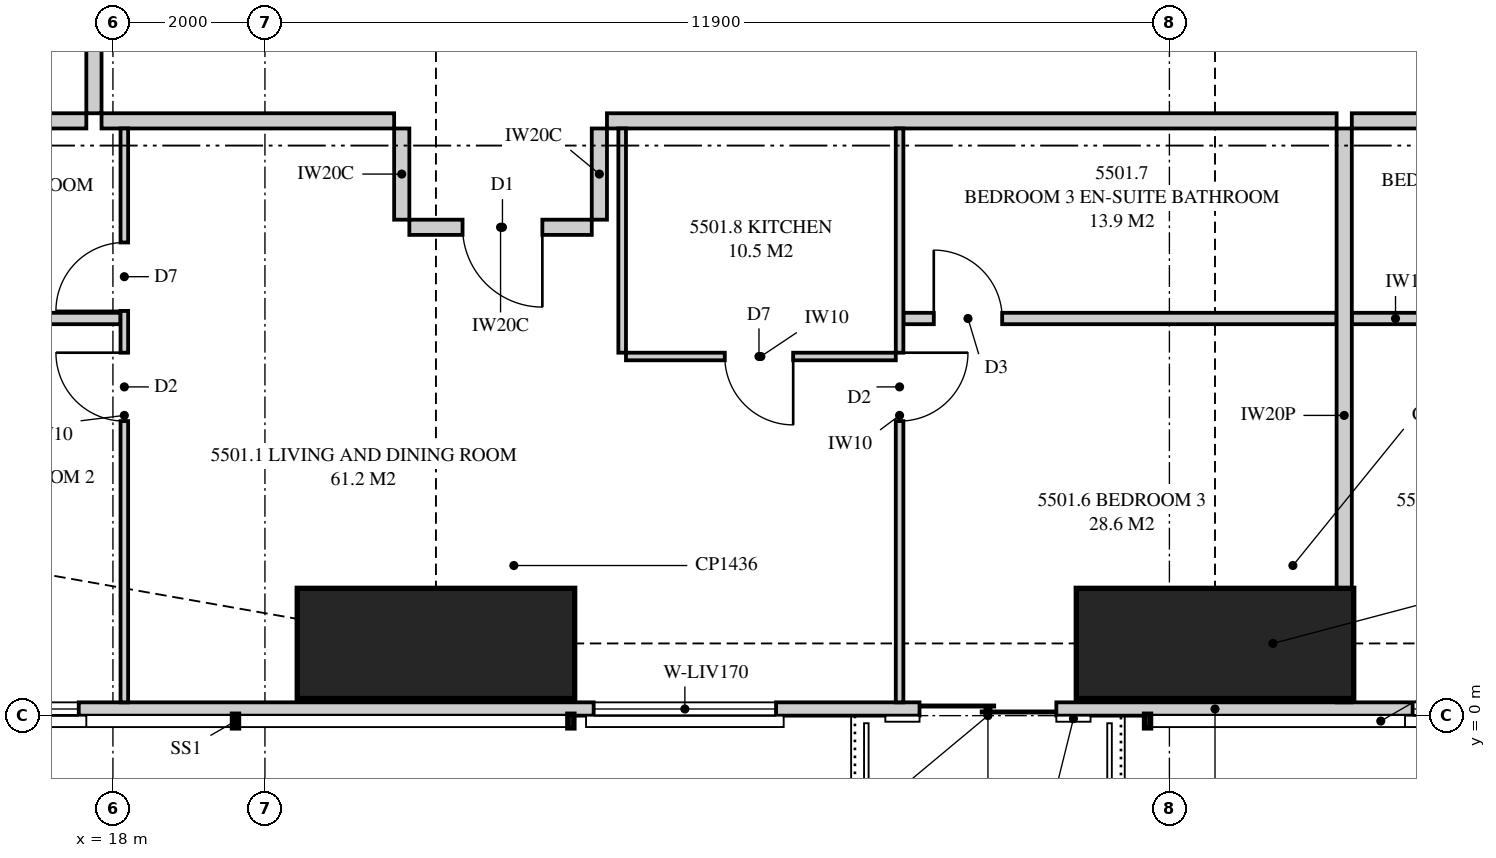
"""IFC4 building model, lengths in metres.
Left out: names, types, materials, properties, quantities, classifications, styles, units other than length and angle.
Written with IfcOpenShell. Run it as: python <this file> out.ifc"""

import sys

from ifc_helpers import new_model, si_unit, direction, frame, frame_2d, origin, origin_2d, place, context, subcontext, project, spatial, polyline, rectangle, outline, extrude, element, fill, save


model = new_model("IFC4")
c1 = context("Model", 3, precision=1e-05, world=origin(), true_north=direction((0.0, 1.0)))
c2 = subcontext(c1, "Body", "Model", "MODEL_VIEW")
j1 = project(units=[si_unit("LENGTHUNIT", "METRE"), si_unit("PLANEANGLEUNIT", "RADIAN")], contexts=[c1])
p1 = place(None, origin())
s1 = spatial("IfcSite", under=j1, at=p1, CompositionType="ELEMENT")
p2 = place(p1, origin())
s2 = spatial("IfcBuilding", under=s1, at=p2, CompositionType="ELEMENT")
p3 = place(p2, frame((0.0, 0.0, 201.25)))
s3 = spatial("IfcBuildingStorey", under=s2, at=p3, CompositionType="ELEMENT", Elevation=201.25)
for number, where, z_axis, x_axis in (
    (1, (22.25, 0.95, 0.0), (0.0, 0.0, 1.0), (0.0, 1.0, 0.0)),
    (2, (32.5, 0.95, 0.0), (0.0, 0.0, 1.0), (0.0, 1.0, 0.0)),
):
    element("IfcColumn", number, at=place(p3, frame(where, z_axis=z_axis, x_axis=x_axis)), inside=s3, PredefinedType="COLUMN", context=c2, shape_type="SweptSolid", body=[
        extrude(rectangle(XDim=1.45, YDim=3.65, at=origin_2d()), origin(), (0.0, 0.0, 1.0), 3.35),
    ])
p4 = place(p3, frame((15.051, 0.087, 0.0), z_axis=(0.0, 0.0, 1.0), x_axis=(1.0, 0.0, 0.0)))
e3 = element("IfcWall", 3, at=p4, inside=s3, PredefinedType="SOLIDWALL", context=c2, shape_type="SweptSolid", body=[
    extrude(outline(polyline([(0.0, 0.0), (34.897, 0.0), (34.897, 3.11), (27.91, 3.11), (27.91, 2.15), (27.836, 2.15), (27.836, 3.11), (27.699, 3.11), (27.699, 2.15), (7.199, 2.15), (7.199, 3.11), (7.062, 3.11), (7.062, 2.15), (6.987, 2.15), (6.987, 3.11), (0.0, 3.11), (0.0, 0.0)])), frame((0.0, 0.087, 0.0), z_axis=(0.0, -1.0, 0.0), x_axis=(1.0, 0.0, 0.0)), (0.0, 0.0, 1.0), 0.175),
])
p5 = place(p4, frame((0.699, 0.0, 0.4)))
e4 = element("IfcOpeningElement", 4, at=p5, cuts=e3, PredefinedType="OPENING", context=c2, shape_type="SweptSolid", body=[
    extrude(rectangle(XDim=1.8, YDim=1.7, at=frame_2d((0.9, 0.85))), frame((0.0, 0.097, 0.0), z_axis=(0.0, -1.0, 0.0), x_axis=(1.0, 0.0, 0.0)), (0.0, 0.0, 1.0), 0.195),
])
p6 = place(p4, frame((9.274, 0.0, 0.4)))
e5 = element("IfcOpeningElement", 5, at=p6, cuts=e3, PredefinedType="OPENING", context=c2, shape_type="SweptSolid", body=[
    extrude(rectangle(XDim=2.4, YDim=1.7, at=frame_2d((1.2, 0.85))), frame((0.0, 0.097, 0.0), z_axis=(0.0, -1.0, 0.0), x_axis=(1.0, 0.0, 0.0)), (0.0, 0.0, 1.0), 0.195),
])
p7 = place(p4, frame((13.561, 0.0, 0.0)))
e6 = element("IfcOpeningElement", 6, at=p7, cuts=e3, PredefinedType="OPENING", context=c2, shape_type="SweptSolid", body=[
    extrude(rectangle(XDim=1.8, YDim=2.1, at=frame_2d((0.9, 1.05))), frame((0.0, 0.097, 0.0), z_axis=(0.0, -1.0, 0.0), x_axis=(1.0, 0.0, 0.0)), (0.0, 0.0, 1.0), 0.195),
])
p8 = place(p4, frame((20.049, 0.0, 0.4)))
e7 = element("IfcOpeningElement", 7, at=p8, cuts=e3, PredefinedType="OPENING", context=c2, shape_type="SweptSolid", body=[
    extrude(rectangle(XDim=1.8, YDim=1.7, at=frame_2d((0.9, 0.85))), frame((0.0, 0.097, 0.0), z_axis=(0.0, -1.0, 0.0), x_axis=(1.0, 0.0, 0.0)), (0.0, 0.0, 1.0), 0.195),
])
p9 = place(p4, frame((23.649, 0.0, 0.4)))
e8 = element("IfcOpeningElement", 8, at=p9, cuts=e3, PredefinedType="OPENING", context=c2, shape_type="SweptSolid", body=[
    extrude(rectangle(XDim=1.8, YDim=1.7, at=frame_2d((0.9, 0.85))), frame((0.0, 0.097, 0.0), z_axis=(0.0, -1.0, 0.0), x_axis=(1.0, 0.0, 0.0)), (0.0, 0.0, 1.0), 0.195),
])
p10 = place(p4, frame((29.625, 0.0, 0.4)))
e9 = element("IfcOpeningElement", 9, at=p10, cuts=e3, PredefinedType="OPENING", context=c2, shape_type="SweptSolid", body=[
    extrude(rectangle(XDim=1.8, YDim=1.7, at=frame_2d((0.9, 0.85))), frame((0.0, 0.097, 0.0), z_axis=(0.0, -1.0, 0.0), x_axis=(1.0, 0.0, 0.0)), (0.0, 0.0, 1.0), 0.195),
])
p11 = place(p4, frame((32.51, 0.0, 0.4)))
e10 = element("IfcOpeningElement", 10, at=p11, cuts=e3, PredefinedType="OPENING", context=c2, shape_type="SweptSolid", body=[
    extrude(rectangle(XDim=1.8, YDim=1.7, at=frame_2d((0.9, 0.85))), frame((0.0, 0.097, 0.0), z_axis=(0.0, -1.0, 0.0), x_axis=(1.0, 0.0, 0.0)), (0.0, 0.0, 1.0), 0.195),
])
p12 = place(p3, frame((34.2, 0.175, 0.0), z_axis=(0.0, 0.0, 1.0), x_axis=(0.0, 1.0, 0.0)))
e11 = element("IfcWall", 11, at=p12, inside=s3, PredefinedType="PARTITIONING", context=c2, shape_type="SweptSolid", body=[
    extrude(outline(polyline([(0.0, 0.0), (7.55, 0.0), (7.55, 3.11), (1.685, 3.11), (1.685, 2.15), (0.0, 2.15), (0.0, 3.11), (0.0, 0.0)])), frame((0.0, 0.1, 0.0), z_axis=(0.0, -1.0, 0.0), x_axis=(1.0, 0.0, 0.0)), (0.0, 0.0, 1.0), 0.2),
])
p13 = place(p3, frame((17.85, 7.825, 0.0), z_axis=(0.0, 0.0, 1.0), x_axis=(1.0, 0.0, 0.0)))
e12 = element("IfcWall", 12, at=p13, inside=s3, PredefinedType="PARTITIONING", context=c2, shape_type="SweptSolid", body=[
    extrude(rectangle(XDim=3.85, YDim=0.2, at=frame_2d((1.925, 0.0))), origin(), (0.0, 0.0, 1.0), 3.11),
])
p14 = place(p3, frame((18.15, 0.175, 0.0), z_axis=(0.0, 0.0, 1.0), x_axis=(0.0, 1.0, 0.0)))
e13 = element("IfcWall", 13, at=p14, inside=s3, PredefinedType="PARTITIONING", context=c2, shape_type="SweptSolid", body=[
    extrude(outline(polyline([(0.0, 0.0), (7.55, 0.0), (7.55, 3.11), (2.374, 3.11), (2.374, 2.15), (0.627, 2.15), (0.627, 3.11), (0.0, 3.11), (0.0, 0.0)])), frame((0.0, 0.05, 0.0), z_axis=(0.0, -1.0, 0.0), x_axis=(1.0, 0.0, 0.0)), (0.0, 0.0, 1.0), 0.1),
])
p15 = place(p14, frame((3.7, 0.0, 0.0)))
e14 = element("IfcOpeningElement", 14, at=p15, cuts=e13, PredefinedType="OPENING", context=c2, shape_type="SweptSolid", body=[
    extrude(rectangle(XDim=0.9, YDim=2.1, at=frame_2d((0.45, 1.05))), frame((0.0, 0.06, 0.0), z_axis=(0.0, -1.0, 0.0), x_axis=(1.0, 0.0, 0.0)), (0.0, 0.0, 1.0), 0.12),
])
p16 = place(p14, frame((5.15, 0.0, 0.0)))
e15 = element("IfcOpeningElement", 15, at=p16, cuts=e13, PredefinedType="OPENING", context=c2, shape_type="SweptSolid", body=[
    extrude(rectangle(XDim=0.9, YDim=2.1, at=frame_2d((0.45, 1.05))), frame((0.0, 0.06, 0.0), z_axis=(0.0, -1.0, 0.0), x_axis=(1.0, 0.0, 0.0)), (0.0, 0.0, 1.0), 0.12),
])
p17 = place(p3, frame((28.35, 0.175, 0.0), z_axis=(0.0, 0.0, 1.0), x_axis=(0.0, 1.0, 0.0)))
e16 = element("IfcWall", 16, at=p17, inside=s3, PredefinedType="PARTITIONING", context=c2, shape_type="SweptSolid", body=[
    extrude(outline(polyline([(0.0, 0.0), (7.55, 0.0), (7.55, 3.11), (1.635, 3.11), (1.635, 2.15), (0.0, 2.15), (0.0, 3.11), (0.0, 0.0)])), frame((0.0, 0.05, 0.0), z_axis=(0.0, -1.0, 0.0), x_axis=(1.0, 0.0, 0.0)), (0.0, 0.0, 1.0), 0.1),
])
p18 = place(p17, frame((3.7, 0.0, 0.0)))
e17 = element("IfcOpeningElement", 17, at=p18, cuts=e16, PredefinedType="OPENING", context=c2, shape_type="SweptSolid", body=[
    extrude(rectangle(XDim=0.9, YDim=2.1, at=frame_2d((0.45, 1.05))), frame((0.0, 0.06, 0.0), z_axis=(0.0, -1.0, 0.0), x_axis=(1.0, 0.0, 0.0)), (0.0, 0.0, 1.0), 0.12),
])
p19 = place(p3, frame((15.2, 5.225, 0.0), z_axis=(0.0, 0.0, 1.0), x_axis=(1.0, 0.0, 0.0)))
e18 = element("IfcWall", 18, at=p19, inside=s3, PredefinedType="PLUMBINGWALL", context=c2, shape_type="SweptSolid", body=[
    extrude(rectangle(XDim=2.9, YDim=0.15, at=frame_2d((1.45, 0.0))), origin(), (0.0, 0.0, 1.0), 3.11),
])
p20 = place(p3, frame((28.4, 5.225, 0.0), z_axis=(0.0, 0.0, 1.0), x_axis=(1.0, 0.0, 0.0)))
e19 = element("IfcWall", 19, at=p20, inside=s3, PredefinedType="PLUMBINGWALL", context=c2, shape_type="SweptSolid", body=[
    extrude(outline(polyline([(0.0, 0.0), (5.7, 0.0), (5.7, 3.11), (4.412, 3.11), (4.412, 2.541), (3.788, 2.541), (3.788, 3.11), (0.0, 3.11), (0.0, 0.0)])), frame((0.0, 0.075, 0.0), z_axis=(0.0, -1.0, 0.0), x_axis=(1.0, 0.0, 0.0)), (0.0, 0.0, 1.0), 0.15),
])
p21 = place(p20, frame((0.4, 0.0, 0.0)))
e20 = element("IfcOpeningElement", 20, at=p21, cuts=e19, PredefinedType="OPENING", context=c2, shape_type="SweptSolid", body=[
    extrude(rectangle(XDim=0.9, YDim=2.1, at=frame_2d((0.45, 1.05))), frame((0.0, 0.085, 0.0), z_axis=(0.0, -1.0, 0.0), x_axis=(1.0, 0.0, 0.0)), (0.0, 0.0, 1.0), 0.17),
])
p22 = place(p3, frame((24.75, 4.725, 0.0), z_axis=(0.0, 0.0, 1.0), x_axis=(1.0, 0.0, 0.0)))
e21 = element("IfcWall", 21, at=p22, inside=s3, PredefinedType="PARTITIONING", context=c2, shape_type="SweptSolid", body=[
    extrude(rectangle(XDim=3.55, YDim=0.1, at=frame_2d((1.775, 0.0))), origin(), (0.0, 0.0, 1.0), 3.11),
])
p23 = place(p22, frame((1.3, 0.0, 0.0)))
e22 = element("IfcOpeningElement", 22, at=p23, cuts=e21, PredefinedType="OPENING", context=c2, shape_type="SweptSolid", body=[
    extrude(rectangle(XDim=0.9, YDim=2.1, at=frame_2d((0.45, 1.05))), frame((0.0, 0.06, 0.0), z_axis=(0.0, -1.0, 0.0), x_axis=(1.0, 0.0, 0.0)), (0.0, 0.0, 1.0), 0.12),
])
p24 = place(p3, frame((24.7, 4.775, 0.0), z_axis=(0.0, 0.0, 1.0), x_axis=(0.0, 1.0, 0.0)))
e23 = element("IfcWall", 23, at=p24, inside=s3, PredefinedType="PARTITIONING", context=c2, shape_type="SweptSolid", body=[
    extrude(rectangle(XDim=2.95, YDim=0.1, at=frame_2d((1.475, 0.0))), origin(), (0.0, 0.0, 1.0), 3.11),
])
p25 = place(p3, frame((34.3, 7.825, 0.0), z_axis=(0.0, 0.0, 1.0), x_axis=(1.0, 0.0, 0.0)))
e24 = element("IfcWall", 24, at=p25, inside=s3, PredefinedType="PARTITIONING", context=c2, shape_type="SweptSolid", body=[
    extrude(outline(polyline([(0.0, 0.0), (11.65, 0.0), (11.65, 3.11), (8.787, 3.11), (8.787, 2.541), (8.113, 2.541), (8.113, 3.11), (0.0, 3.11), (0.0, 0.0)])), frame((0.0, 0.1, 0.0), z_axis=(0.0, -1.0, 0.0), x_axis=(1.0, 0.0, 0.0)), (0.0, 0.0, 1.0), 0.2),
])
p26 = place(p25, frame((8.8, 0.0, 0.0)))
e25 = element("IfcOpeningElement", 25, at=p26, cuts=e24, PredefinedType="OPENING", context=c2, shape_type="SweptSolid", body=[
    extrude(rectangle(XDim=1.05, YDim=2.2, at=frame_2d((0.525, 1.1))), frame((0.0, 0.11, 0.0), z_axis=(0.0, -1.0, 0.0), x_axis=(1.0, 0.0, 0.0)), (0.0, 0.0, 1.0), 0.22),
])
p27 = place(p3, frame((34.3, 5.225, 0.0), z_axis=(0.0, 0.0, 1.0), x_axis=(1.0, 0.0, 0.0)))
e26 = element("IfcWall", 26, at=p27, inside=s3, PredefinedType="PLUMBINGWALL", context=c2, shape_type="SweptSolid", body=[
    extrude(rectangle(XDim=3.45, YDim=0.15, at=frame_2d((1.725, 0.0))), origin(), (0.0, 0.0, 1.0), 3.11),
])
p28 = place(p27, frame((2.15, 0.0, 0.0)))
e27 = element("IfcOpeningElement", 27, at=p28, cuts=e26, PredefinedType="OPENING", context=c2, shape_type="SweptSolid", body=[
    extrude(rectangle(XDim=0.9, YDim=2.1, at=frame_2d((0.45, 1.05))), frame((0.0, 0.085, 0.0), z_axis=(0.0, -1.0, 0.0), x_axis=(1.0, 0.0, 0.0)), (0.0, 0.0, 1.0), 0.17),
])
p29 = place(p3, frame((12.0, 7.825, 0.0), z_axis=(0.0, 0.0, 1.0), x_axis=(1.0, 0.0, 0.0)))
e28 = element("IfcWall", 28, at=p29, inside=s3, PredefinedType="PARTITIONING", context=c2, shape_type="SweptSolid", body=[
    extrude(outline(polyline([(0.0, 0.0), (5.65, 0.0), (5.65, 3.11), (2.547, 3.11), (2.547, 2.15), (0.712, 2.15), (0.712, 3.11), (0.0, 3.11), (0.0, 0.0)])), frame((0.0, 0.1, 0.0), z_axis=(0.0, -1.0, 0.0), x_axis=(1.0, 0.0, 0.0)), (0.0, 0.0, 1.0), 0.2),
])
p30 = place(p3, frame((17.75, 7.925, 0.0), z_axis=(0.0, 0.0, 1.0), x_axis=(0.0, 1.0, 0.0)))
e29 = element("IfcWall", 29, at=p30, inside=s3, PredefinedType="PARTITIONING", context=c2, shape_type="SweptSolid", body=[
    extrude(outline(polyline([(0.0, 0.0), (14.925, 0.0), (14.925, 3.11), (5.412, 3.11), (5.412, 2.541), (4.738, 2.541), (4.738, 3.11), (0.0, 3.11), (0.0, 0.0)])), frame((0.0, 0.1, 0.0), z_axis=(0.0, -1.0, 0.0), x_axis=(1.0, 0.0, 0.0)), (0.0, 0.0, 1.0), 0.2),
])
p31 = place(p30, frame((6.962, 0.0, 0.0)))
e30 = element("IfcOpeningElement", 30, at=p31, cuts=e29, PredefinedType="OPENING", context=c2, shape_type="SweptSolid", body=[
    extrude(rectangle(XDim=1.05, YDim=2.2, at=frame_2d((0.525, 1.1))), frame((0.0, 0.11, 0.0), z_axis=(0.0, -1.0, 0.0), x_axis=(1.0, 0.0, 0.0)), (0.0, 0.0, 1.0), 0.22),
])
p32 = place(p3, frame((24.5, 7.825, 0.0), z_axis=(0.0, 0.0, 1.0), x_axis=(1.0, 0.0, 0.0)))
e31 = element("IfcWall", 31, at=p32, inside=s3, PredefinedType="PARTITIONING", context=c2, shape_type="SweptSolid", body=[
    extrude(outline(polyline([(0.0, 0.0), (9.6, 0.0), (9.6, 3.11), (8.337, 3.11), (8.337, 2.541), (7.663, 2.541), (7.663, 3.11), (0.0, 3.11), (0.0, 0.0)])), frame((0.0, 0.1, 0.0), z_axis=(0.0, -1.0, 0.0), x_axis=(1.0, 0.0, 0.0)), (0.0, 0.0, 1.0), 0.2),
])
p33 = place(p3, frame((21.9, 6.425, 0.0), z_axis=(0.0, 0.0, 1.0), x_axis=(1.0, 0.0, 0.0)))
e32 = element("IfcWall", 32, at=p33, inside=s3, PredefinedType="PARTITIONING", context=c2, shape_type="SweptSolid", body=[
    extrude(outline(polyline([(0.0, 0.0), (2.4, 0.0), (2.4, 3.11), (0.687, 3.11), (0.687, 2.541), (0.013, 2.541), (0.013, 3.11), (0.0, 3.11), (0.0, 0.0)])), frame((0.0, 0.1, 0.0), z_axis=(0.0, -1.0, 0.0), x_axis=(1.0, 0.0, 0.0)), (0.0, 0.0, 1.0), 0.2),
])
p34 = place(p33, frame((0.7, 0.0, 0.0)))
e33 = element("IfcOpeningElement", 33, at=p34, cuts=e32, PredefinedType="OPENING", context=c2, shape_type="SweptSolid", body=[
    extrude(rectangle(XDim=1.05, YDim=2.2, at=frame_2d((0.525, 1.1))), frame((0.0, 0.11, 0.0), z_axis=(0.0, -1.0, 0.0), x_axis=(1.0, 0.0, 0.0)), (0.0, 0.0, 1.0), 0.22),
])
for number, where, z_axis, x_axis in (
    (34, (21.8, 7.725, 0.0), (0.0, 0.0, 1.0), (0.0, -1.0, 0.0)),
    (35, (24.4, 7.725, 0.0), (0.0, 0.0, 1.0), (0.0, -1.0, 0.0)),
):
    element("IfcWall", number, at=place(p3, frame(where, z_axis=z_axis, x_axis=x_axis)), inside=s3, PredefinedType="PARTITIONING", context=c2, shape_type="SweptSolid", body=[
        extrude(rectangle(XDim=1.2, YDim=0.2, at=frame_2d((0.6, 0.0))), origin(), (0.0, 0.0, 1.0), 3.11),
    ])
p35 = place(p5, origin())
e36 = element("IfcWindow", 36, at=p35, inside=s3, PartitioningType="SINGLE_PANEL", PredefinedType="WINDOW", context=c2, shape_type="SweptSolid", body=[
    extrude(rectangle(XDim=1.8, YDim=1.7, at=frame_2d((0.9, 0.85))), frame((0.0, 0.03, 0.0), z_axis=(0.0, -1.0, 0.0), x_axis=(1.0, 0.0, 0.0)), (0.0, 0.0, 1.0), 0.06),
])
fill(e4, e36)
p36 = place(p6, origin())
e37 = element("IfcWindow", 37, at=p36, inside=s3, PartitioningType="SINGLE_PANEL", PredefinedType="WINDOW", context=c2, shape_type="SweptSolid", body=[
    extrude(rectangle(XDim=2.4, YDim=1.7, at=frame_2d((1.2, 0.85))), frame((0.0, 0.03, 0.0), z_axis=(0.0, -1.0, 0.0), x_axis=(1.0, 0.0, 0.0)), (0.0, 0.0, 1.0), 0.06),
])
fill(e5, e37)
p37 = place(p7, origin())
e38 = element("IfcDoor", 38, at=p37, inside=s3, OperationType="SLIDING_TO_LEFT", PredefinedType="DOOR", context=c2, shape_type="SweptSolid", body=[
    extrude(rectangle(XDim=1.8, YDim=2.1, at=frame_2d((0.9, 1.05))), frame((0.0, 0.025, 0.0), z_axis=(0.0, -1.0, 0.0), x_axis=(1.0, 0.0, 0.0)), (0.0, 0.0, 1.0), 0.05),
])
fill(e6, e38)
p38 = place(p8, origin())
e39 = element("IfcWindow", 39, at=p38, inside=s3, PartitioningType="SINGLE_PANEL", PredefinedType="WINDOW", context=c2, shape_type="SweptSolid", body=[
    extrude(rectangle(XDim=1.8, YDim=1.7, at=frame_2d((0.9, 0.85))), frame((0.0, 0.03, 0.0), z_axis=(0.0, -1.0, 0.0), x_axis=(1.0, 0.0, 0.0)), (0.0, 0.0, 1.0), 0.06),
])
fill(e7, e39)
p39 = place(p34, frame((1.05, 0.0, 0.0), z_axis=(0.0, 0.0, 1.0), x_axis=(-1.0, 0.0, 0.0)))
e40 = element("IfcDoor", 40, at=p39, inside=s3, OperationType="SINGLE_SWING_LEFT", PredefinedType="DOOR", context=c2, shape_type="SweptSolid", body=[
    extrude(rectangle(XDim=1.05, YDim=2.2, at=frame_2d((0.525, 1.1))), frame((0.0, 0.025, 0.0), z_axis=(0.0, -1.0, 0.0), x_axis=(1.0, 0.0, 0.0)), (0.0, 0.0, 1.0), 0.05),
])
fill(e33, e40)
p40 = place(p15, origin())
e41 = element("IfcDoor", 41, at=p40, inside=s3, OperationType="SINGLE_SWING_RIGHT", PredefinedType="DOOR", context=c2, shape_type="SweptSolid", body=[
    extrude(rectangle(XDim=0.9, YDim=2.1, at=frame_2d((0.45, 1.05))), frame((0.0, 0.025, 0.0), z_axis=(0.0, -1.0, 0.0), x_axis=(1.0, 0.0, 0.0)), (0.0, 0.0, 1.0), 0.05),
])
fill(e14, e41)
p41 = place(p16, origin())
e42 = element("IfcDoor", 42, at=p41, inside=s3, OperationType="SINGLE_SWING_LEFT", PredefinedType="DOOR", context=c2, shape_type="SweptSolid", body=[
    extrude(rectangle(XDim=0.9, YDim=2.1, at=frame_2d((0.45, 1.05))), frame((0.0, 0.025, 0.0), z_axis=(0.0, -1.0, 0.0), x_axis=(1.0, 0.0, 0.0)), (0.0, 0.0, 1.0), 0.05),
])
fill(e15, e42)
p42 = place(p18, frame((0.9, 0.0, 0.0), z_axis=(0.0, 0.0, 1.0), x_axis=(-1.0, 0.0, 0.0)))
e43 = element("IfcDoor", 43, at=p42, inside=s3, OperationType="SINGLE_SWING_LEFT", PredefinedType="DOOR", context=c2, shape_type="SweptSolid", body=[
    extrude(rectangle(XDim=0.9, YDim=2.1, at=frame_2d((0.45, 1.05))), frame((0.0, 0.025, 0.0), z_axis=(0.0, -1.0, 0.0), x_axis=(1.0, 0.0, 0.0)), (0.0, 0.0, 1.0), 0.05),
])
fill(e17, e43)
p43 = place(p21, origin())
e44 = element("IfcDoor", 44, at=p43, inside=s3, OperationType="SINGLE_SWING_LEFT", PredefinedType="DOOR", context=c2, shape_type="SweptSolid", body=[
    extrude(rectangle(XDim=0.9, YDim=2.1, at=frame_2d((0.45, 1.05))), frame((0.0, 0.025, 0.0), z_axis=(0.0, -1.0, 0.0), x_axis=(1.0, 0.0, 0.0)), (0.0, 0.0, 1.0), 0.05),
])
fill(e20, e44)
p44 = place(p23, frame((0.9, 0.0, 0.0), z_axis=(0.0, 0.0, 1.0), x_axis=(-1.0, 0.0, 0.0)))
e45 = element("IfcDoor", 45, at=p44, inside=s3, OperationType="SINGLE_SWING_LEFT", PredefinedType="DOOR", context=c2, shape_type="SweptSolid", body=[
    extrude(rectangle(XDim=0.9, YDim=2.1, at=frame_2d((0.45, 1.05))), frame((0.0, 0.025, 0.0), z_axis=(0.0, -1.0, 0.0), x_axis=(1.0, 0.0, 0.0)), (0.0, 0.0, 1.0), 0.05),
])
fill(e22, e45)
save(model, sys.argv[1])
